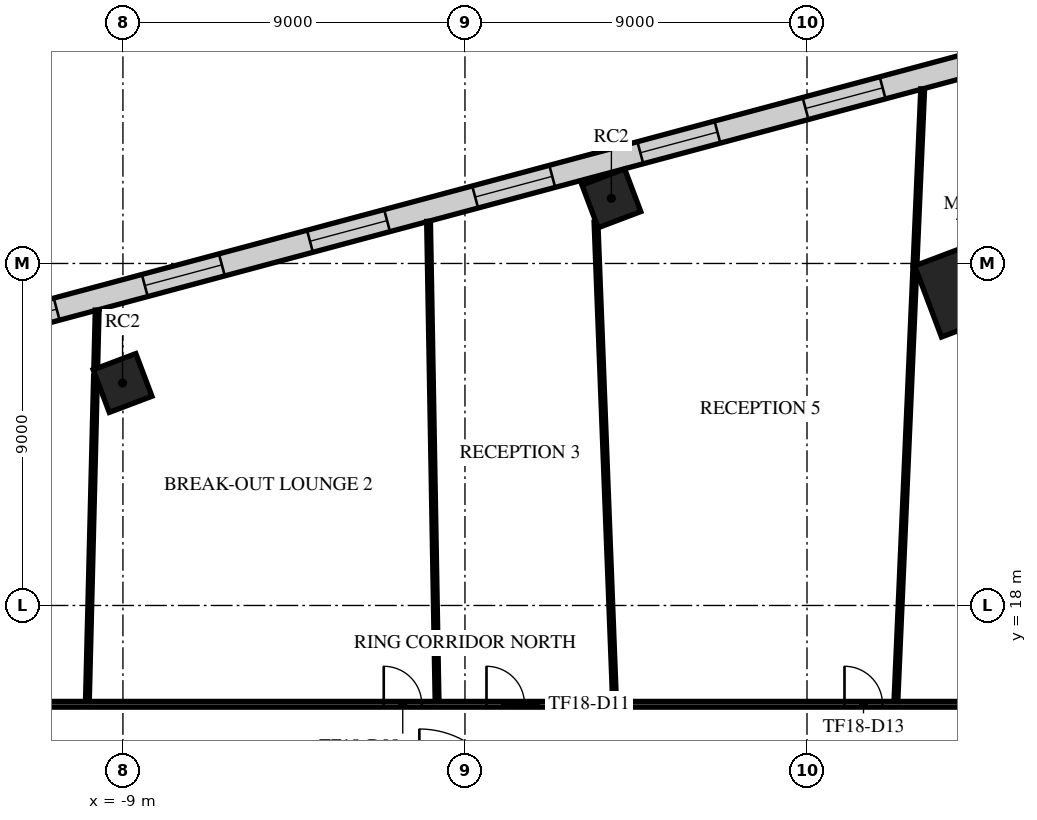
"""IFC4 building model, lengths in metres.
Left out: names, types, materials, properties, quantities, classifications, styles, units other than length and angle.
Written with IfcOpenShell. Run it as: python <this file> out.ifc"""

import sys

from ifc_helpers import new_model, si_unit, direction, frame, frame_2d, origin, origin_2d, place, context, subcontext, project, spatial, rectangle, extrude, element, fill, save


model = new_model("IFC4")
c1 = context("Model", 3, precision=1e-05, world=origin(), true_north=direction((0.0, 1.0)))
c2 = subcontext(c1, "Body", "Model", "MODEL_VIEW")
j1 = project(units=[si_unit("LENGTHUNIT", "METRE"), si_unit("PLANEANGLEUNIT", "RADIAN")], contexts=[c1])
p1 = place(None, origin())
s1 = spatial("IfcSite", under=j1, at=p1, CompositionType="ELEMENT")
p2 = place(p1, origin())
s2 = spatial("IfcBuilding", under=s1, at=p2, CompositionType="ELEMENT")
p3 = place(p2, frame((0.0, 0.0, 86.1)))
s3 = spatial("IfcBuildingStorey", under=s2, at=p3, CompositionType="ELEMENT", Elevation=86.1)
p4 = place(p3, frame((13.122, 26.354, 0.0), z_axis=(0.0, 0.0, 1.0), x_axis=(0.935491525991, 0.353349125935, 0.0)))
e1 = element("IfcColumn", 1, at=p4, inside=s3, PredefinedType="COLUMN", context=c2, shape_type="SweptSolid", body=[
    extrude(rectangle(XDim=2.0, YDim=2.0, at=origin_2d()), origin(), (0.0, 0.0, 1.0), 4.0),
])
for number, where, z_axis, x_axis in (
    (2, (3.853, 28.714, 0.0), (0.0, 0.0, 1.0), (0.935, 0.353, 0.0)),
    (3, (-9.01, 23.855, 0.0), (0.0, 0.0, 1.0), (0.935, 0.353, 0.0)),
):
    element("IfcColumn", number, at=place(p3, frame(where, z_axis=z_axis, x_axis=x_axis)), inside=s3, PredefinedType="COLUMN", context=c2, shape_type="SweptSolid", body=[
        extrude(rectangle(XDim=1.2, YDim=1.2, at=origin_2d()), origin(), (0.0, 0.0, 1.0), 4.0),
    ])
p5 = place(p3, frame((16.496, 33.097, 0.0), z_axis=(0.0, 0.0, 1.0), x_axis=(-0.965926333894, -0.258817150689, 0.0)))
e4 = element("IfcWall", 4, at=p5, inside=s3, PredefinedType="STANDARD", context=c2, shape_type="SweptSolid", body=[
    extrude(rectangle(XDim=49.376, YDim=0.6, at=frame_2d((24.688, 0.0))), origin(), (0.0, 0.0, 1.0), 3.58),
])
p6 = place(p5, frame((1.2, 0.0, 0.9)))
e5 = element("IfcOpeningElement", 5, at=p6, cuts=e4, PredefinedType="OPENING", context=c2, shape_type="SweptSolid", body=[
    extrude(rectangle(XDim=2.1, YDim=2.1, at=frame_2d((1.05, 1.05))), frame((0.0, 0.31, 0.0), z_axis=(0.0, -1.0, 0.0), x_axis=(1.0, 0.0, 0.0)), (0.0, 0.0, 1.0), 0.62),
])
p7 = place(p5, frame((5.7, 0.0, 0.9)))
e6 = element("IfcOpeningElement", 6, at=p7, cuts=e4, PredefinedType="OPENING", context=c2, shape_type="SweptSolid", body=[
    extrude(rectangle(XDim=2.1, YDim=2.1, at=frame_2d((1.05, 1.05))), frame((0.0, 0.31, 0.0), z_axis=(0.0, -1.0, 0.0), x_axis=(1.0, 0.0, 0.0)), (0.0, 0.0, 1.0), 0.62),
])
p8 = place(p5, frame((10.2, 0.0, 0.9)))
e7 = element("IfcOpeningElement", 7, at=p8, cuts=e4, PredefinedType="OPENING", context=c2, shape_type="SweptSolid", body=[
    extrude(rectangle(XDim=2.1, YDim=2.1, at=frame_2d((1.05, 1.05))), frame((0.0, 0.31, 0.0), z_axis=(0.0, -1.0, 0.0), x_axis=(1.0, 0.0, 0.0)), (0.0, 0.0, 1.0), 0.62),
])
p9 = place(p5, frame((14.7, 0.0, 0.9)))
e8 = element("IfcOpeningElement", 8, at=p9, cuts=e4, PredefinedType="OPENING", context=c2, shape_type="SweptSolid", body=[
    extrude(rectangle(XDim=2.1, YDim=2.1, at=frame_2d((1.05, 1.05))), frame((0.0, 0.31, 0.0), z_axis=(0.0, -1.0, 0.0), x_axis=(1.0, 0.0, 0.0)), (0.0, 0.0, 1.0), 0.62),
])
p10 = place(p5, frame((19.2, 0.0, 0.9)))
e9 = element("IfcOpeningElement", 9, at=p10, cuts=e4, PredefinedType="OPENING", context=c2, shape_type="SweptSolid", body=[
    extrude(rectangle(XDim=2.1, YDim=2.1, at=frame_2d((1.05, 1.05))), frame((0.0, 0.31, 0.0), z_axis=(0.0, -1.0, 0.0), x_axis=(1.0, 0.0, 0.0)), (0.0, 0.0, 1.0), 0.62),
])
p11 = place(p5, frame((23.7, 0.0, 0.9)))
e10 = element("IfcOpeningElement", 10, at=p11, cuts=e4, PredefinedType="OPENING", context=c2, shape_type="SweptSolid", body=[
    extrude(rectangle(XDim=2.1, YDim=2.1, at=frame_2d((1.05, 1.05))), frame((0.0, 0.31, 0.0), z_axis=(0.0, -1.0, 0.0), x_axis=(1.0, 0.0, 0.0)), (0.0, 0.0, 1.0), 0.62),
])
p12 = place(p5, frame((28.2, 0.0, 0.9)))
e11 = element("IfcOpeningElement", 11, at=p12, cuts=e4, PredefinedType="OPENING", context=c2, shape_type="SweptSolid", body=[
    extrude(rectangle(XDim=2.1, YDim=2.1, at=frame_2d((1.05, 1.05))), frame((0.0, 0.31, 0.0), z_axis=(0.0, -1.0, 0.0), x_axis=(1.0, 0.0, 0.0)), (0.0, 0.0, 1.0), 0.62),
])
p13 = place(p5, frame((32.7, 0.0, 0.9)))
e12 = element("IfcOpeningElement", 12, at=p13, cuts=e4, PredefinedType="OPENING", context=c2, shape_type="SweptSolid", body=[
    extrude(rectangle(XDim=2.1, YDim=2.1, at=frame_2d((1.05, 1.05))), frame((0.0, 0.31, 0.0), z_axis=(0.0, -1.0, 0.0), x_axis=(1.0, 0.0, 0.0)), (0.0, 0.0, 1.0), 0.62),
])
p14 = place(p5, frame((37.2, 0.0, 0.9)))
e13 = element("IfcOpeningElement", 13, at=p14, cuts=e4, PredefinedType="OPENING", context=c2, shape_type="SweptSolid", body=[
    extrude(rectangle(XDim=2.1, YDim=2.1, at=frame_2d((1.05, 1.05))), frame((0.0, 0.31, 0.0), z_axis=(0.0, -1.0, 0.0), x_axis=(1.0, 0.0, 0.0)), (0.0, 0.0, 1.0), 0.62),
])
p15 = place(p5, frame((41.7, 0.0, 0.9)))
e14 = element("IfcOpeningElement", 14, at=p15, cuts=e4, PredefinedType="OPENING", context=c2, shape_type="SweptSolid", body=[
    extrude(rectangle(XDim=2.1, YDim=2.1, at=frame_2d((1.05, 1.05))), frame((0.0, 0.31, 0.0), z_axis=(0.0, -1.0, 0.0), x_axis=(1.0, 0.0, 0.0)), (0.0, 0.0, 1.0), 0.62),
])
p16 = place(p5, frame((46.138, 0.0, 0.9)))
e15 = element("IfcOpeningElement", 15, at=p16, cuts=e4, PredefinedType="OPENING", context=c2, shape_type="SweptSolid", body=[
    extrude(rectangle(XDim=2.1, YDim=2.1, at=frame_2d((1.05, 1.05))), frame((0.0, 0.31, 0.0), z_axis=(0.0, -1.0, 0.0), x_axis=(1.0, 0.0, 0.0)), (0.0, 0.0, 1.0), 0.62),
])
p17 = place(p3, frame((-15.325, 15.4, 0.0), z_axis=(0.0, 0.0, 1.0), x_axis=(1.0, 0.0, 0.0)))
e16 = element("IfcWall", 16, at=p17, inside=s3, PredefinedType="PARTITIONING", context=c2, shape_type="SweptSolid", body=[
    extrude(rectangle(XDim=30.725, YDim=0.15, at=frame_2d((15.362, 0.0))), origin(), (0.0, 0.0, 1.0), 3.08),
])
p18 = place(p17, frame((2.05, 0.0, 0.0)))
e17 = element("IfcOpeningElement", 17, at=p18, cuts=e16, PredefinedType="OPENING", context=c2, shape_type="SweptSolid", body=[
    extrude(rectangle(XDim=1.8, YDim=2.1, at=frame_2d((0.9, 1.05))), frame((0.0, 0.085, 0.0), z_axis=(0.0, -1.0, 0.0), x_axis=(1.0, 0.0, 0.0)), (0.0, 0.0, 1.0), 0.17),
])
p19 = place(p17, frame((13.188, 0.0, 0.0)))
e18 = element("IfcOpeningElement", 18, at=p19, cuts=e16, PredefinedType="OPENING", context=c2, shape_type="SweptSolid", body=[
    extrude(rectangle(XDim=1.0, YDim=2.1, at=frame_2d((0.5, 1.05))), frame((0.0, 0.085, 0.0), z_axis=(0.0, -1.0, 0.0), x_axis=(1.0, 0.0, 0.0)), (0.0, 0.0, 1.0), 0.17),
])
p20 = place(p17, frame((15.892, 0.0, 0.0)))
e19 = element("IfcOpeningElement", 19, at=p20, cuts=e16, PredefinedType="OPENING", context=c2, shape_type="SweptSolid", body=[
    extrude(rectangle(XDim=1.0, YDim=2.1, at=frame_2d((0.5, 1.05))), frame((0.0, 0.085, 0.0), z_axis=(0.0, -1.0, 0.0), x_axis=(1.0, 0.0, 0.0)), (0.0, 0.0, 1.0), 0.17),
])
p21 = place(p17, frame((25.312, 0.0, 0.0)))
e20 = element("IfcOpeningElement", 20, at=p21, cuts=e16, PredefinedType="OPENING", context=c2, shape_type="SweptSolid", body=[
    extrude(rectangle(XDim=1.0, YDim=2.1, at=frame_2d((0.5, 1.05))), frame((0.0, 0.085, 0.0), z_axis=(0.0, -1.0, 0.0), x_axis=(1.0, 0.0, 0.0)), (0.0, 0.0, 1.0), 0.17),
])
p22 = place(p17, frame((29.211, 0.0, 0.0)))
e21 = element("IfcOpeningElement", 21, at=p22, cuts=e16, PredefinedType="OPENING", context=c2, shape_type="SweptSolid", body=[
    extrude(rectangle(XDim=1.0, YDim=2.1, at=frame_2d((0.5, 1.05))), frame((0.0, 0.085, 0.0), z_axis=(0.0, -1.0, 0.0), x_axis=(1.0, 0.0, 0.0)), (0.0, 0.0, 1.0), 0.17),
])
p23 = place(p3, frame((-9.935, 15.476, 0.0), z_axis=(0.0, 0.0, 1.0), x_axis=(0.024996463825, 0.999687539582, 0.0)))
e22 = element("IfcWall", 22, at=p23, inside=s3, PredefinedType="PARTITIONING", context=c2, shape_type="SweptSolid", body=[
    extrude(rectangle(XDim=8.566, YDim=0.1, at=frame_2d((4.283, 0.0))), origin(), (0.0, 0.0, 1.0), 3.58),
])
p24 = place(p3, frame((-9.716, 24.229, 0.0), z_axis=(0.0, 0.0, 1.0), x_axis=(0.025011966744, 0.999687151823, 0.0)))
e23 = element("IfcWall", 23, at=p24, inside=s3, PredefinedType="PARTITIONING", context=c2, shape_type="SweptSolid", body=[
    extrude(rectangle(XDim=1.542, YDim=0.1, at=frame_2d((0.771, 0.0))), origin(), (0.0, 0.0, 1.0), 3.58),
])
p25 = place(p3, frame((-0.958, 28.108, 0.0), z_axis=(0.0, 0.0, 1.0), x_axis=(0.017700788333, -0.999843328773, 0.0)))
e24 = element("IfcWall", 24, at=p25, inside=s3, PredefinedType="PARTITIONING", context=c2, shape_type="SweptSolid", body=[
    extrude(rectangle(XDim=12.634, YDim=0.1, at=frame_2d((6.317, 0.0))), origin(), (0.0, 0.0, 1.0), 3.58),
])
p26 = place(p3, frame((3.448, 28.089, 0.0), z_axis=(0.0, 0.0, 1.0), x_axis=(0.038608436219, -0.999254416379, 0.0)))
e25 = element("IfcWall", 25, at=p26, inside=s3, PredefinedType="PARTITIONING", context=c2, shape_type="SweptSolid", body=[
    extrude(rectangle(XDim=12.622, YDim=0.1, at=frame_2d((6.311, 0.0))), origin(), (0.0, 0.0, 1.0), 2.96),
])
p27 = place(p3, frame((11.339, 15.477, 0.0), z_axis=(0.0, 0.0, 1.0), x_axis=(0.04370366829, 0.999044538235, 0.0)))
e26 = element("IfcWall", 26, at=p27, inside=s3, PredefinedType="PARTITIONING", context=c2, shape_type="SweptSolid", body=[
    extrude(rectangle(XDim=11.452, YDim=0.1, at=frame_2d((5.726, 0.0))), origin(), (0.0, 0.0, 1.0), 3.58),
])
p28 = place(p3, frame((11.841, 26.939, 0.0), z_axis=(0.0, 0.0, 1.0), x_axis=(0.04372159787, 0.999043753736, 0.0)))
e27 = element("IfcWall", 27, at=p28, inside=s3, PredefinedType="PARTITIONING", context=c2, shape_type="SweptSolid", body=[
    extrude(rectangle(XDim=4.657, YDim=0.1, at=frame_2d((2.329, 0.0))), origin(), (0.0, 0.0, 1.0), 3.58),
])
p29 = place(p7, origin())
e28 = element("IfcWindow", 28, at=p29, inside=s3, PartitioningType="SINGLE_PANEL", PredefinedType="WINDOW", context=c2, shape_type="SweptSolid", body=[
    extrude(rectangle(XDim=2.1, YDim=2.1, at=frame_2d((1.05, 1.05))), frame((0.0, 0.03, 0.0), z_axis=(0.0, -1.0, 0.0), x_axis=(1.0, 0.0, 0.0)), (0.0, 0.0, 1.0), 0.06),
])
fill(e6, e28)
p30 = place(p8, origin())
e29 = element("IfcWindow", 29, at=p30, inside=s3, PartitioningType="SINGLE_PANEL", PredefinedType="WINDOW", context=c2, shape_type="SweptSolid", body=[
    extrude(rectangle(XDim=2.1, YDim=2.1, at=frame_2d((1.05, 1.05))), frame((0.0, 0.03, 0.0), z_axis=(0.0, -1.0, 0.0), x_axis=(1.0, 0.0, 0.0)), (0.0, 0.0, 1.0), 0.06),
])
fill(e7, e29)
p31 = place(p9, origin())
e30 = element("IfcWindow", 30, at=p31, inside=s3, PartitioningType="SINGLE_PANEL", PredefinedType="WINDOW", context=c2, shape_type="SweptSolid", body=[
    extrude(rectangle(XDim=2.1, YDim=2.1, at=frame_2d((1.05, 1.05))), frame((0.0, 0.03, 0.0), z_axis=(0.0, -1.0, 0.0), x_axis=(1.0, 0.0, 0.0)), (0.0, 0.0, 1.0), 0.06),
])
fill(e8, e30)
p32 = place(p10, origin())
e31 = element("IfcWindow", 31, at=p32, inside=s3, PartitioningType="SINGLE_PANEL", PredefinedType="WINDOW", context=c2, shape_type="SweptSolid", body=[
    extrude(rectangle(XDim=2.1, YDim=2.1, at=frame_2d((1.05, 1.05))), frame((0.0, 0.03, 0.0), z_axis=(0.0, -1.0, 0.0), x_axis=(1.0, 0.0, 0.0)), (0.0, 0.0, 1.0), 0.06),
])
fill(e9, e31)
p33 = place(p11, origin())
e32 = element("IfcWindow", 32, at=p33, inside=s3, PartitioningType="SINGLE_PANEL", PredefinedType="WINDOW", context=c2, shape_type="SweptSolid", body=[
    extrude(rectangle(XDim=2.1, YDim=2.1, at=frame_2d((1.05, 1.05))), frame((0.0, 0.03, 0.0), z_axis=(0.0, -1.0, 0.0), x_axis=(1.0, 0.0, 0.0)), (0.0, 0.0, 1.0), 0.06),
])
fill(e10, e32)
p34 = place(p12, origin())
e33 = element("IfcWindow", 33, at=p34, inside=s3, PartitioningType="SINGLE_PANEL", PredefinedType="WINDOW", context=c2, shape_type="SweptSolid", body=[
    extrude(rectangle(XDim=2.1, YDim=2.1, at=frame_2d((1.05, 1.05))), frame((0.0, 0.03, 0.0), z_axis=(0.0, -1.0, 0.0), x_axis=(1.0, 0.0, 0.0)), (0.0, 0.0, 1.0), 0.06),
])
fill(e11, e33)
p35 = place(p19, origin())
e34 = element("IfcDoor", 34, at=p35, inside=s3, OperationType="SINGLE_SWING_RIGHT", PredefinedType="DOOR", context=c2, shape_type="SweptSolid", body=[
    extrude(rectangle(XDim=1.0, YDim=2.1, at=frame_2d((0.5, 1.05))), frame((0.0, 0.025, 0.0), z_axis=(0.0, -1.0, 0.0), x_axis=(1.0, 0.0, 0.0)), (0.0, 0.0, 1.0), 0.05),
])
fill(e18, e34)
p36 = place(p20, origin())
e35 = element("IfcDoor", 35, at=p36, inside=s3, OperationType="SINGLE_SWING_LEFT", PredefinedType="DOOR", context=c2, shape_type="SweptSolid", body=[
    extrude(rectangle(XDim=1.0, YDim=2.1, at=frame_2d((0.5, 1.05))), frame((0.0, 0.025, 0.0), z_axis=(0.0, -1.0, 0.0), x_axis=(1.0, 0.0, 0.0)), (0.0, 0.0, 1.0), 0.05),
])
fill(e19, e35)
p37 = place(p21, origin())
e36 = element("IfcDoor", 36, at=p37, inside=s3, OperationType="SINGLE_SWING_RIGHT", PredefinedType="DOOR", context=c2, shape_type="SweptSolid", body=[
    extrude(rectangle(XDim=1.0, YDim=2.1, at=frame_2d((0.5, 1.05))), frame((0.0, 0.025, 0.0), z_axis=(0.0, -1.0, 0.0), x_axis=(1.0, 0.0, 0.0)), (0.0, 0.0, 1.0), 0.05),
])
fill(e20, e36)
save(model, sys.argv[1])
